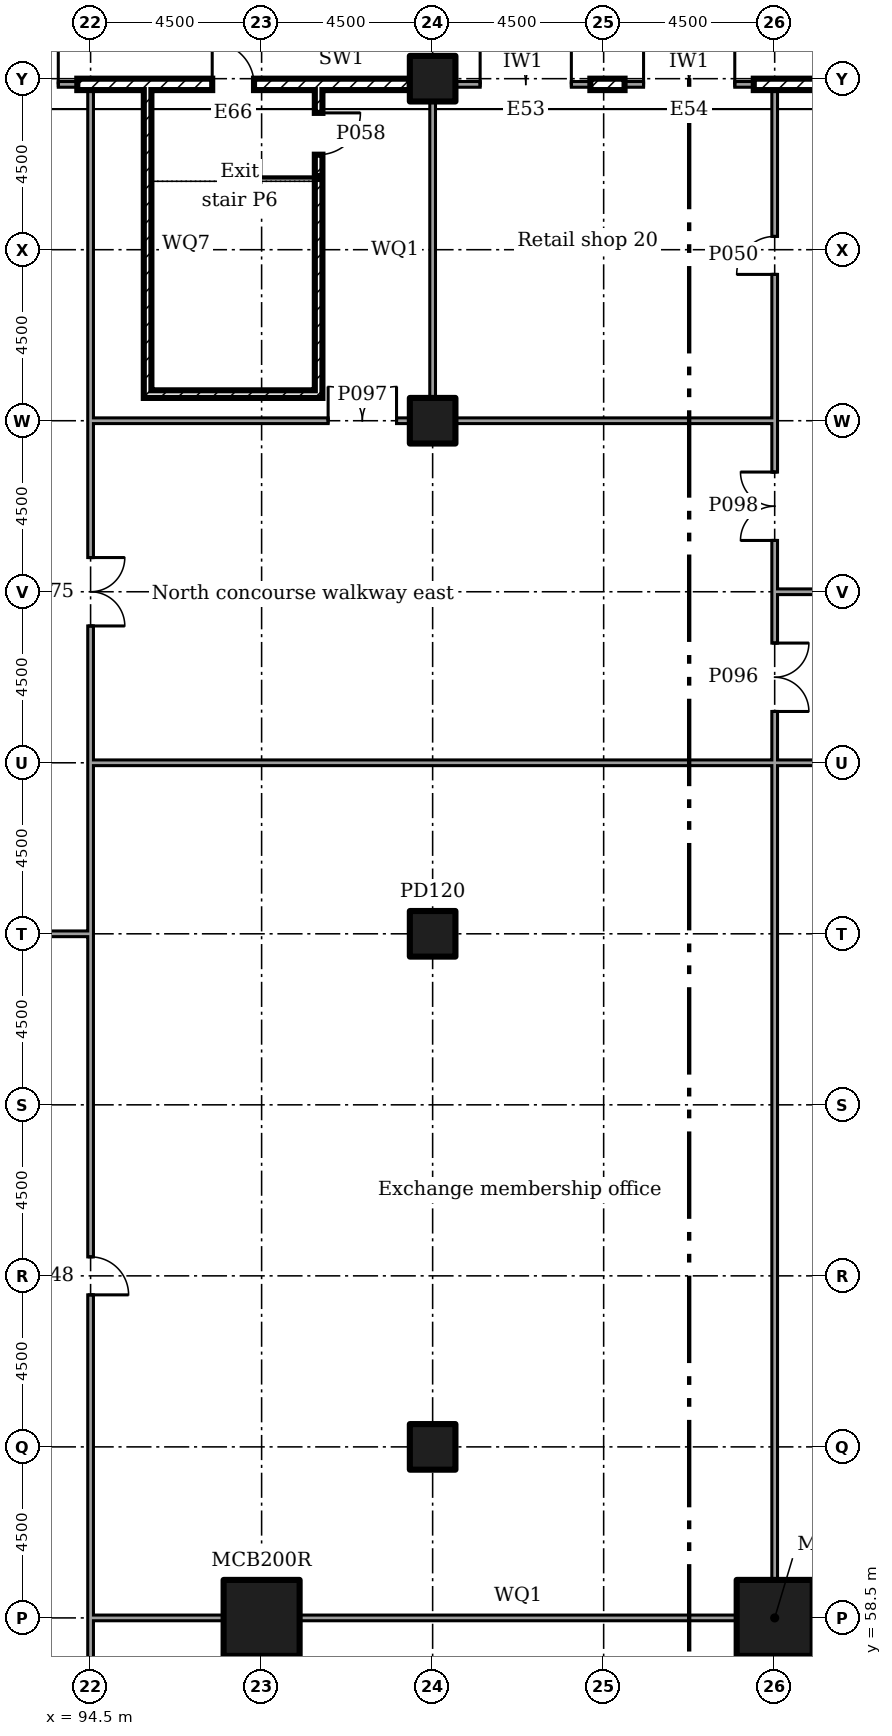
"""IFC4 building model, lengths in metres.
Left out: names, types, materials, properties, quantities, classifications, styles, units other than length and angle.
Written with IfcOpenShell. Run it as: python <this file> out.ifc"""

import sys

from ifc_helpers import new_model, si_unit, direction, frame, frame_2d, origin, origin_2d, place, context, subcontext, project, spatial, rectangle, extrude, element, fill, save


model = new_model("IFC4")
c1 = context("Model", 3, precision=1e-05, world=origin(), true_north=direction((0.0, 1.0)))
c2 = subcontext(c1, "Body", "Model", "MODEL_VIEW")
j1 = project(units=[si_unit("LENGTHUNIT", "METRE"), si_unit("PLANEANGLEUNIT", "RADIAN")], contexts=[c1])
p1 = place(None, origin())
s1 = spatial("IfcSite", under=j1, at=p1, CompositionType="ELEMENT")
p2 = place(p1, origin())
s2 = spatial("IfcBuilding", under=s1, at=p2, CompositionType="ELEMENT")
p3 = place(p2, origin())
s3 = spatial("IfcBuildingStorey", under=s2, at=p3, CompositionType="ELEMENT", Elevation=0.0)
for number, where in (
    (1, (99.0, 58.5, 0.0)),
    (2, (112.5, 58.5, 0.0)),
):
    element("IfcColumn", number, at=place(p3, frame(where)), inside=s3, PredefinedType="COLUMN", context=c2, shape_type="SweptSolid", body=[
        extrude(rectangle(XDim=2.0, YDim=2.0, at=origin_2d()), origin(), (0.0, 0.0, 1.0), 6.0),
    ])
for number, where in (
    (3, (103.5, 63.0, 0.0)),
    (4, (103.5, 76.5, 0.0)),
    (5, (103.5, 90.0, 0.0)),
    (6, (103.5, 99.0, 0.0)),
):
    element("IfcColumn", number, at=place(p3, frame(where)), inside=s3, PredefinedType="COLUMN", context=c2, shape_type="SweptSolid", body=[
        extrude(rectangle(XDim=1.2, YDim=1.2, at=origin_2d()), origin(), (0.0, 0.0, 1.0), 6.0),
    ])
p4 = place(p3, frame((116.4, 98.85, 0.0), z_axis=(0.0, 0.0, 1.0), x_axis=(-1.0, 0.0, 0.0)))
e7 = element("IfcWall", 7, at=p4, inside=s3, PredefinedType="ELEMENTEDWALL", context=c2, shape_type="SweptSolid", body=[
    extrude(rectangle(XDim=4.45, YDim=0.3, at=frame_2d((2.225, 0.0))), origin(), (0.0, 0.0, 1.0), 5.55),
])
p5 = place(p3, frame((111.95, 98.85, 0.0), z_axis=(0.0, 0.0, 1.0), x_axis=(-1.0, 0.0, 0.0)))
e8 = element("IfcWall", 8, at=p5, inside=s3, PredefinedType="SOLIDWALL", context=c2, shape_type="SweptSolid", body=[
    extrude(rectangle(XDim=3.4, YDim=0.15, at=frame_2d((1.7, 0.0))), origin(), (0.0, 0.0, 1.0), 5.55),
])
p6 = place(p5, frame((0.5, 0.0, 0.0)))
e9 = element("IfcOpeningElement", 9, at=p6, cuts=e8, PredefinedType="OPENING", context=c2, shape_type="SweptSolid", body=[
    extrude(rectangle(XDim=2.4, YDim=2.7, at=frame_2d((1.2, 1.35))), frame((0.0, 0.085, 0.0), z_axis=(0.0, -1.0, 0.0), x_axis=(1.0, 0.0, 0.0)), (0.0, 0.0, 1.0), 0.17),
])
p7 = place(p3, frame((108.55, 98.85, 0.0), z_axis=(0.0, 0.0, 1.0), x_axis=(-1.0, 0.0, 0.0)))
e10 = element("IfcWall", 10, at=p7, inside=s3, PredefinedType="ELEMENTEDWALL", context=c2, shape_type="SweptSolid", body=[
    extrude(rectangle(XDim=0.9, YDim=0.3, at=frame_2d((0.45, 0.0))), origin(), (0.0, 0.0, 1.0), 5.55),
])
p8 = place(p3, frame((107.65, 98.85, 0.0), z_axis=(0.0, 0.0, 1.0), x_axis=(-1.0, 0.0, 0.0)))
e11 = element("IfcWall", 11, at=p8, inside=s3, PredefinedType="SOLIDWALL", context=c2, shape_type="SweptSolid", body=[
    extrude(rectangle(XDim=3.55, YDim=0.15, at=frame_2d((1.775, 0.0))), origin(), (0.0, 0.0, 1.0), 5.55),
])
p9 = place(p8, frame((0.5, 0.0, 0.0)))
e12 = element("IfcOpeningElement", 12, at=p9, cuts=e11, PredefinedType="OPENING", context=c2, shape_type="SweptSolid", body=[
    extrude(rectangle(XDim=2.4, YDim=2.7, at=frame_2d((1.2, 1.35))), frame((0.0, 0.085, 0.0), z_axis=(0.0, -1.0, 0.0), x_axis=(1.0, 0.0, 0.0)), (0.0, 0.0, 1.0), 0.17),
])
p10 = place(p3, frame((102.9, 98.85, 0.0), z_axis=(0.0, 0.0, 1.0), x_axis=(-1.0, 0.0, 0.0)))
e13 = element("IfcWall", 13, at=p10, inside=s3, PredefinedType="ELEMENTEDWALL", context=c2, shape_type="SweptSolid", body=[
    extrude(rectangle(XDim=3.6, YDim=0.3, at=frame_2d((1.8, 0.0))), origin(), (0.0, 0.0, 1.0), 5.55),
])
p11 = place(p3, frame((99.3, 98.85, 0.0), z_axis=(0.0, 0.0, 1.0), x_axis=(-1.0, 0.0, 0.0)))
e14 = element("IfcWall", 14, at=p11, inside=s3, PredefinedType="ELEMENTEDWALL", context=c2, shape_type="SweptSolid", body=[
    extrude(rectangle(XDim=2.1, YDim=0.3, at=frame_2d((1.05, 0.0))), origin(), (0.0, 0.0, 1.0), 5.55),
])
p12 = place(p11, frame((0.5, 0.0, 0.0)))
e15 = element("IfcOpeningElement", 15, at=p12, cuts=e14, PredefinedType="OPENING", context=c2, shape_type="SweptSolid", body=[
    extrude(rectangle(XDim=1.1, YDim=2.4, at=frame_2d((0.55, 1.2))), frame((0.0, 0.16, 0.0), z_axis=(0.0, -1.0, 0.0), x_axis=(1.0, 0.0, 0.0)), (0.0, 0.0, 1.0), 0.32),
])
p13 = place(p3, frame((97.2, 98.85, 0.0), z_axis=(0.0, 0.0, 1.0), x_axis=(-1.0, 0.0, 0.0)))
e16 = element("IfcWall", 16, at=p13, inside=s3, PredefinedType="ELEMENTEDWALL", context=c2, shape_type="SweptSolid", body=[
    extrude(rectangle(XDim=3.05, YDim=0.3, at=frame_2d((1.525, 0.0))), origin(), (0.0, 0.0, 1.0), 5.55),
])
p14 = place(p3, frame((94.15, 98.85, 0.0), z_axis=(0.0, 0.0, 1.0), x_axis=(-1.0, 0.0, 0.0)))
e17 = element("IfcWall", 17, at=p14, inside=s3, PredefinedType="SOLIDWALL", context=c2, shape_type="SweptSolid", body=[
    extrude(rectangle(XDim=3.55, YDim=0.15, at=frame_2d((1.775, 0.0))), origin(), (0.0, 0.0, 1.0), 5.55),
])
p15 = place(p14, frame((0.5, 0.0, 0.0)))
e18 = element("IfcOpeningElement", 18, at=p15, cuts=e17, PredefinedType="OPENING", context=c2, shape_type="SweptSolid", body=[
    extrude(rectangle(XDim=2.4, YDim=2.7, at=frame_2d((1.2, 1.35))), frame((0.0, 0.085, 0.0), z_axis=(0.0, -1.0, 0.0), x_axis=(1.0, 0.0, 0.0)), (0.0, 0.0, 1.0), 0.17),
])
p16 = place(p3, frame((90.595, 76.5, 0.0)))
e19 = element("IfcWall", 19, at=p16, inside=s3, PredefinedType="PARTITIONING", context=c2, shape_type="SweptSolid", body=[
    extrude(rectangle(XDim=3.98, YDim=0.15, at=frame_2d((1.99, 0.0))), origin(), (0.0, 0.0, 1.0), 5.55),
])
p17 = place(p3, frame((94.5, 54.995, 0.0), z_axis=(0.0, 0.0, 1.0), x_axis=(0.0, 1.0, 0.0)))
e20 = element("IfcWall", 20, at=p17, inside=s3, PredefinedType="PARTITIONING", context=c2, shape_type="SweptSolid", body=[
    extrude(rectangle(XDim=3.58, YDim=0.15, at=frame_2d((1.79, 0.0))), origin(), (0.0, 0.0, 1.0), 5.55),
])
p18 = place(p3, frame((94.5, 58.5, 0.0), z_axis=(0.0, 0.0, 1.0), x_axis=(0.0, 1.0, 0.0)))
e21 = element("IfcWall", 21, at=p18, inside=s3, PredefinedType="PARTITIONING", context=c2, shape_type="SweptSolid", body=[
    extrude(rectangle(XDim=17.925, YDim=0.15, at=frame_2d((8.962, 0.0))), origin(), (0.0, 0.0, 1.0), 5.55),
])
p19 = place(p18, frame((8.5, 0.0, 0.0)))
e22 = element("IfcOpeningElement", 22, at=p19, cuts=e21, PredefinedType="OPENING", context=c2, shape_type="SweptSolid", body=[
    extrude(rectangle(XDim=1.0, YDim=2.1, at=frame_2d((0.5, 1.05))), frame((0.0, 0.085, 0.0), z_axis=(0.0, -1.0, 0.0), x_axis=(1.0, 0.0, 0.0)), (0.0, 0.0, 1.0), 0.17),
])
p20 = place(p3, frame((94.5, 76.5, 0.0), z_axis=(0.0, 0.0, 1.0), x_axis=(0.0, 1.0, 0.0)))
e23 = element("IfcWall", 23, at=p20, inside=s3, PredefinedType="PARTITIONING", context=c2, shape_type="SweptSolid", body=[
    extrude(rectangle(XDim=4.575, YDim=0.15, at=frame_2d((2.288, 0.0))), origin(), (0.0, 0.0, 1.0), 5.55),
])
p21 = place(p3, frame((94.5, 81.0, 0.0), z_axis=(0.0, 0.0, 1.0), x_axis=(0.0, 1.0, 0.0)))
e24 = element("IfcWall", 24, at=p21, inside=s3, PredefinedType="PARTITIONING", context=c2, shape_type="SweptSolid", body=[
    extrude(rectangle(XDim=9.075, YDim=0.15, at=frame_2d((4.538, 0.0))), origin(), (0.0, 0.0, 1.0), 5.55),
])
p22 = place(p21, frame((3.6, 0.0, 0.0)))
e25 = element("IfcOpeningElement", 25, at=p22, cuts=e24, PredefinedType="OPENING", context=c2, shape_type="SweptSolid", body=[
    extrude(rectangle(XDim=1.8, YDim=2.1, at=frame_2d((0.9, 1.05))), frame((0.0, 0.085, 0.0), z_axis=(0.0, -1.0, 0.0), x_axis=(1.0, 0.0, 0.0)), (0.0, 0.0, 1.0), 0.17),
])
p23 = place(p3, frame((94.5, 90.0, 0.0), z_axis=(0.0, 0.0, 1.0), x_axis=(0.0, 1.0, 0.0)))
e26 = element("IfcWall", 26, at=p23, inside=s3, PredefinedType="PARTITIONING", context=c2, shape_type="SweptSolid", body=[
    extrude(rectangle(XDim=8.7, YDim=0.15, at=frame_2d((4.35, 0.0))), origin(), (0.0, 0.0, 1.0), 5.55),
])
p24 = place(p3, frame((99.0, 54.0, 0.0), z_axis=(0.0, 0.0, 1.0), x_axis=(0.0, 1.0, 0.0)))
e27 = element("IfcWall", 27, at=p24, inside=s3, PredefinedType="PARTITIONING", context=c2, shape_type="SweptSolid", body=[
    extrude(rectangle(XDim=3.505, YDim=0.15, at=frame_2d((1.752, 0.0))), origin(), (0.0, 0.0, 1.0), 5.55),
])
p25 = place(p3, frame((94.575, 58.5, 0.0)))
e28 = element("IfcWall", 28, at=p25, inside=s3, PredefinedType="PARTITIONING", context=c2, shape_type="SweptSolid", body=[
    extrude(rectangle(XDim=3.43, YDim=0.15, at=frame_2d((1.715, 0.0))), origin(), (0.0, 0.0, 1.0), 5.55),
])
p26 = place(p3, frame((112.5, 54.075, 0.0), z_axis=(0.0, 0.0, 1.0), x_axis=(0.0, 1.0, 0.0)))
e29 = element("IfcWall", 29, at=p26, inside=s3, PredefinedType="PARTITIONING", context=c2, shape_type="SweptSolid", body=[
    extrude(rectangle(XDim=3.43, YDim=0.15, at=frame_2d((1.715, 0.0))), origin(), (0.0, 0.0, 1.0), 5.55),
])
p27 = place(p3, frame((99.995, 58.5, 0.0)))
e30 = element("IfcWall", 30, at=p27, inside=s3, PredefinedType="PARTITIONING", context=c2, shape_type="SweptSolid", body=[
    extrude(rectangle(XDim=11.51, YDim=0.15, at=frame_2d((5.755, 0.0))), origin(), (0.0, 0.0, 1.0), 5.55),
])
p28 = place(p3, frame((113.495, 58.5, 0.0)))
e31 = element("IfcWall", 31, at=p28, inside=s3, PredefinedType="PARTITIONING", context=c2, shape_type="SweptSolid", body=[
    extrude(rectangle(XDim=7.01, YDim=0.15, at=frame_2d((3.505, 0.0))), origin(), (0.0, 0.0, 1.0), 5.55),
])
p29 = place(p3, frame((112.5, 59.495, 0.0), z_axis=(0.0, 0.0, 1.0), x_axis=(0.0, 1.0, 0.0)))
e32 = element("IfcWall", 32, at=p29, inside=s3, PredefinedType="PARTITIONING", context=c2, shape_type="SweptSolid", body=[
    extrude(rectangle(XDim=21.58, YDim=0.15, at=frame_2d((10.79, 0.0))), origin(), (0.0, 0.0, 1.0), 5.55),
])
p30 = place(p3, frame((94.575, 81.0, 0.0)))
e33 = element("IfcWall", 33, at=p30, inside=s3, PredefinedType="PARTITIONING", context=c2, shape_type="SweptSolid", body=[
    extrude(rectangle(XDim=17.85, YDim=0.15, at=frame_2d((8.925, 0.0))), origin(), (0.0, 0.0, 1.0), 5.55),
])
p31 = place(p3, frame((112.425, 81.0, 0.0)))
e34 = element("IfcWall", 34, at=p31, inside=s3, PredefinedType="PARTITIONING", context=c2, shape_type="SweptSolid", body=[
    extrude(rectangle(XDim=22.5, YDim=0.15, at=frame_2d((11.25, 0.0))), origin(), (0.0, 0.0, 1.0), 5.55),
])
p32 = place(p3, frame((112.5, 81.075, 0.0), z_axis=(0.0, 0.0, 1.0), x_axis=(0.0, 1.0, 0.0)))
e35 = element("IfcWall", 35, at=p32, inside=s3, PredefinedType="PARTITIONING", context=c2, shape_type="SweptSolid", body=[
    extrude(rectangle(XDim=4.5, YDim=0.15, at=frame_2d((2.25, 0.0))), origin(), (0.0, 0.0, 1.0), 5.55),
])
p33 = place(p32, frame((1.275, 0.0, 0.0)))
e36 = element("IfcOpeningElement", 36, at=p33, cuts=e35, PredefinedType="OPENING", context=c2, shape_type="SweptSolid", body=[
    extrude(rectangle(XDim=1.8, YDim=2.1, at=frame_2d((0.9, 1.05))), frame((0.0, 0.085, 0.0), z_axis=(0.0, -1.0, 0.0), x_axis=(1.0, 0.0, 0.0)), (0.0, 0.0, 1.0), 0.17),
])
p34 = place(p3, frame((94.575, 90.0, 0.0)))
e37 = element("IfcWall", 37, at=p34, inside=s3, PredefinedType="PARTITIONING", context=c2, shape_type="SweptSolid", body=[
    extrude(rectangle(XDim=8.33, YDim=0.15, at=frame_2d((4.165, 0.0))), origin(), (0.0, 0.0, 1.0), 5.55),
])
p35 = place(p34, frame((6.175, 0.0, 0.0)))
e38 = element("IfcOpeningElement", 38, at=p35, cuts=e37, PredefinedType="OPENING", context=c2, shape_type="SweptSolid", body=[
    extrude(rectangle(XDim=1.8, YDim=2.1, at=frame_2d((0.9, 1.05))), frame((0.0, 0.085, 0.0), z_axis=(0.0, -1.0, 0.0), x_axis=(1.0, 0.0, 0.0)), (0.0, 0.0, 1.0), 0.17),
])
p36 = place(p3, frame((104.095, 90.0, 0.0)))
e39 = element("IfcWall", 39, at=p36, inside=s3, PredefinedType="PARTITIONING", context=c2, shape_type="SweptSolid", body=[
    extrude(rectangle(XDim=8.48, YDim=0.15, at=frame_2d((4.24, 0.0))), origin(), (0.0, 0.0, 1.0), 5.55),
])
p37 = place(p3, frame((112.5, 85.5, 0.0), z_axis=(0.0, 0.0, 1.0), x_axis=(0.0, 1.0, 0.0)))
e40 = element("IfcWall", 40, at=p37, inside=s3, PredefinedType="PARTITIONING", context=c2, shape_type="SweptSolid", body=[
    extrude(rectangle(XDim=4.425, YDim=0.15, at=frame_2d((2.212, 0.0))), origin(), (0.0, 0.0, 1.0), 5.55),
])
p38 = place(p37, frame((1.35, 0.0, 0.0)))
e41 = element("IfcOpeningElement", 41, at=p38, cuts=e40, PredefinedType="OPENING", context=c2, shape_type="SweptSolid", body=[
    extrude(rectangle(XDim=1.8, YDim=2.1, at=frame_2d((0.9, 1.05))), frame((0.0, 0.085, 0.0), z_axis=(0.0, -1.0, 0.0), x_axis=(1.0, 0.0, 0.0)), (0.0, 0.0, 1.0), 0.17),
])
p39 = place(p3, frame((112.575, 85.5, 0.0)))
e42 = element("IfcWall", 42, at=p39, inside=s3, PredefinedType="PARTITIONING", context=c2, shape_type="SweptSolid", body=[
    extrude(rectangle(XDim=18.0, YDim=0.15, at=frame_2d((9.0, 0.0))), origin(), (0.0, 0.0, 1.0), 5.55),
])
p40 = place(p39, frame((8.025, 0.0, 0.0)))
e43 = element("IfcOpeningElement", 43, at=p40, cuts=e42, PredefinedType="OPENING", context=c2, shape_type="SweptSolid", body=[
    extrude(rectangle(XDim=1.8, YDim=2.1, at=frame_2d((0.9, 1.05))), frame((0.0, 0.085, 0.0), z_axis=(0.0, -1.0, 0.0), x_axis=(1.0, 0.0, 0.0)), (0.0, 0.0, 1.0), 0.17),
])
p41 = place(p3, frame((103.5, 90.595, 0.0), z_axis=(0.0, 0.0, 1.0), x_axis=(0.0, 1.0, 0.0)))
e44 = element("IfcWall", 44, at=p41, inside=s3, PredefinedType="PARTITIONING", context=c2, shape_type="SweptSolid", body=[
    extrude(rectangle(XDim=7.81, YDim=0.15, at=frame_2d((3.905, 0.0))), origin(), (0.0, 0.0, 1.0), 5.55),
])
p42 = place(p3, frame((96.0, 90.6, 0.0), z_axis=(0.0, 0.0, 1.0), x_axis=(0.0, 1.0, 0.0)))
e45 = element("IfcWall", 45, at=p42, inside=s3, PredefinedType="SOLIDWALL", context=c2, shape_type="SweptSolid", body=[
    extrude(rectangle(XDim=8.1, YDim=0.2, at=frame_2d((4.05, 0.0))), origin(), (0.0, 0.0, 1.0), 5.55),
])
p43 = place(p3, frame((100.5, 90.6, 0.0), z_axis=(0.0, 0.0, 1.0), x_axis=(0.0, 1.0, 0.0)))
e46 = element("IfcWall", 46, at=p43, inside=s3, PredefinedType="SOLIDWALL", context=c2, shape_type="SweptSolid", body=[
    extrude(rectangle(XDim=8.1, YDim=0.2, at=frame_2d((4.05, 0.0))), origin(), (0.0, 0.0, 1.0), 5.55),
])
p44 = place(p43, frame((6.4, 0.0, 0.0)))
e47 = element("IfcOpeningElement", 47, at=p44, cuts=e46, PredefinedType="OPENING", context=c2, shape_type="SweptSolid", body=[
    extrude(rectangle(XDim=1.1, YDim=2.1, at=frame_2d((0.55, 1.05))), frame((0.0, 0.11, 0.0), z_axis=(0.0, -1.0, 0.0), x_axis=(1.0, 0.0, 0.0)), (0.0, 0.0, 1.0), 0.22),
])
p45 = place(p3, frame((96.1, 90.7, 0.0)))
e48 = element("IfcWall", 48, at=p45, inside=s3, PredefinedType="SOLIDWALL", context=c2, shape_type="SweptSolid", body=[
    extrude(rectangle(XDim=4.3, YDim=0.2, at=frame_2d((2.15, 0.0))), origin(), (0.0, 0.0, 1.0), 5.55),
])
p46 = place(p3, frame((112.5, 90.0, 0.0), z_axis=(0.0, 0.0, 1.0), x_axis=(0.0, 1.0, 0.0)))
e49 = element("IfcWall", 49, at=p46, inside=s3, PredefinedType="PARTITIONING", context=c2, shape_type="SweptSolid", body=[
    extrude(rectangle(XDim=8.7, YDim=0.15, at=frame_2d((4.35, 0.0))), origin(), (0.0, 0.0, 1.0), 5.55),
])
p47 = place(p46, frame((3.85, 0.0, 0.0)))
e50 = element("IfcOpeningElement", 50, at=p47, cuts=e49, PredefinedType="OPENING", context=c2, shape_type="SweptSolid", body=[
    extrude(rectangle(XDim=1.0, YDim=2.1, at=frame_2d((0.5, 1.05))), frame((0.0, 0.085, 0.0), z_axis=(0.0, -1.0, 0.0), x_axis=(1.0, 0.0, 0.0)), (0.0, 0.0, 1.0), 0.17),
])
p48 = place(p6, frame((2.4, 0.0, 0.0), x_axis=(-1.0, 0.0, 0.0)))
e51 = element("IfcDoor", 51, at=p48, inside=s3, OperationType="DOUBLE_DOOR_DOUBLE_SWING", PredefinedType="NOTDEFINED", context=c2, shape_type="SweptSolid", body=[
    extrude(rectangle(XDim=2.4, YDim=2.7, at=frame_2d((1.2, 1.35))), frame((0.0, 0.025, 0.0), z_axis=(0.0, -1.0, 0.0), x_axis=(1.0, 0.0, 0.0)), (0.0, 0.0, 1.0), 0.05),
])
fill(e9, e51)
p49 = place(p9, frame((2.4, 0.0, 0.0), x_axis=(-1.0, 0.0, 0.0)))
e52 = element("IfcDoor", 52, at=p49, inside=s3, OperationType="DOUBLE_DOOR_DOUBLE_SWING", PredefinedType="NOTDEFINED", context=c2, shape_type="SweptSolid", body=[
    extrude(rectangle(XDim=2.4, YDim=2.7, at=frame_2d((1.2, 1.35))), frame((0.0, 0.025, 0.0), z_axis=(0.0, -1.0, 0.0), x_axis=(1.0, 0.0, 0.0)), (0.0, 0.0, 1.0), 0.05),
])
fill(e12, e52)
p50 = place(p12, frame((1.1, 0.0, 0.0), x_axis=(-1.0, 0.0, 0.0)))
e53 = element("IfcDoor", 53, at=p50, inside=s3, OperationType="SINGLE_SWING_RIGHT", PredefinedType="NOTDEFINED", context=c2, shape_type="SweptSolid", body=[
    extrude(rectangle(XDim=1.1, YDim=2.4, at=frame_2d((0.55, 1.2))), frame((0.0, 0.025, 0.0), z_axis=(0.0, -1.0, 0.0), x_axis=(1.0, 0.0, 0.0)), (0.0, 0.0, 1.0), 0.05),
])
fill(e15, e53)
p51 = place(p15, frame((2.4, 0.0, 0.0), x_axis=(-1.0, 0.0, 0.0)))
e54 = element("IfcDoor", 54, at=p51, inside=s3, OperationType="DOUBLE_DOOR_DOUBLE_SWING", PredefinedType="NOTDEFINED", context=c2, shape_type="SweptSolid", body=[
    extrude(rectangle(XDim=2.4, YDim=2.7, at=frame_2d((1.2, 1.35))), frame((0.0, 0.025, 0.0), z_axis=(0.0, -1.0, 0.0), x_axis=(1.0, 0.0, 0.0)), (0.0, 0.0, 1.0), 0.05),
])
fill(e18, e54)
p52 = place(p19, frame((1.0, 0.0, 0.0), x_axis=(-1.0, 0.0, 0.0)))
e55 = element("IfcDoor", 55, at=p52, inside=s3, OperationType="SINGLE_SWING_LEFT", PredefinedType="DOOR", context=c2, shape_type="SweptSolid", body=[
    extrude(rectangle(XDim=1.0, YDim=2.1, at=frame_2d((0.5, 1.05))), frame((0.0, 0.025, 0.0), z_axis=(0.0, -1.0, 0.0), x_axis=(1.0, 0.0, 0.0)), (0.0, 0.0, 1.0), 0.05),
])
fill(e22, e55)
p53 = place(p47, origin())
e56 = element("IfcDoor", 56, at=p53, inside=s3, OperationType="SINGLE_SWING_RIGHT", PredefinedType="DOOR", context=c2, shape_type="SweptSolid", body=[
    extrude(rectangle(XDim=1.0, YDim=2.1, at=frame_2d((0.5, 1.05))), frame((0.0, 0.025, 0.0), z_axis=(0.0, -1.0, 0.0), x_axis=(1.0, 0.0, 0.0)), (0.0, 0.0, 1.0), 0.05),
])
fill(e50, e56)
p54 = place(p44, frame((1.1, 0.0, 0.0), x_axis=(-1.0, 0.0, 0.0)))
e57 = element("IfcDoor", 57, at=p54, inside=s3, OperationType="SINGLE_SWING_RIGHT", PredefinedType="DOOR", context=c2, shape_type="SweptSolid", body=[
    extrude(rectangle(XDim=1.1, YDim=2.1, at=frame_2d((0.55, 1.05))), frame((0.0, 0.025, 0.0), z_axis=(0.0, -1.0, 0.0), x_axis=(1.0, 0.0, 0.0)), (0.0, 0.0, 1.0), 0.05),
])
fill(e47, e57)
p55 = place(p22, frame((1.8, 0.0, 0.0), x_axis=(-1.0, 0.0, 0.0)))
e58 = element("IfcDoor", 58, at=p55, inside=s3, OperationType="DOUBLE_DOOR_SINGLE_SWING", PredefinedType="DOOR", context=c2, shape_type="SweptSolid", body=[
    extrude(rectangle(XDim=1.8, YDim=2.1, at=frame_2d((0.9, 1.05))), frame((0.0, 0.025, 0.0), z_axis=(0.0, -1.0, 0.0), x_axis=(1.0, 0.0, 0.0)), (0.0, 0.0, 1.0), 0.05),
])
fill(e25, e58)
p56 = place(p33, frame((1.8, 0.0, 0.0), x_axis=(-1.0, 0.0, 0.0)))
e59 = element("IfcDoor", 59, at=p56, inside=s3, OperationType="DOUBLE_DOOR_SINGLE_SWING", PredefinedType="DOOR", context=c2, shape_type="SweptSolid", body=[
    extrude(rectangle(XDim=1.8, YDim=2.1, at=frame_2d((0.9, 1.05))), frame((0.0, 0.025, 0.0), z_axis=(0.0, -1.0, 0.0), x_axis=(1.0, 0.0, 0.0)), (0.0, 0.0, 1.0), 0.05),
])
fill(e36, e59)
p57 = place(p35, origin())
e60 = element("IfcDoor", 60, at=p57, inside=s3, OperationType="DOUBLE_DOOR_SINGLE_SWING", PredefinedType="DOOR", context=c2, shape_type="SweptSolid", body=[
    extrude(rectangle(XDim=1.8, YDim=2.1, at=frame_2d((0.9, 1.05))), frame((0.0, 0.025, 0.0), z_axis=(0.0, -1.0, 0.0), x_axis=(1.0, 0.0, 0.0)), (0.0, 0.0, 1.0), 0.05),
])
fill(e38, e60)
p58 = place(p38, origin())
e61 = element("IfcDoor", 61, at=p58, inside=s3, OperationType="DOUBLE_DOOR_SINGLE_SWING", PredefinedType="DOOR", context=c2, shape_type="SweptSolid", body=[
    extrude(rectangle(XDim=1.8, YDim=2.1, at=frame_2d((0.9, 1.05))), frame((0.0, 0.025, 0.0), z_axis=(0.0, -1.0, 0.0), x_axis=(1.0, 0.0, 0.0)), (0.0, 0.0, 1.0), 0.05),
])
fill(e41, e61)
save(model, sys.argv[1])
